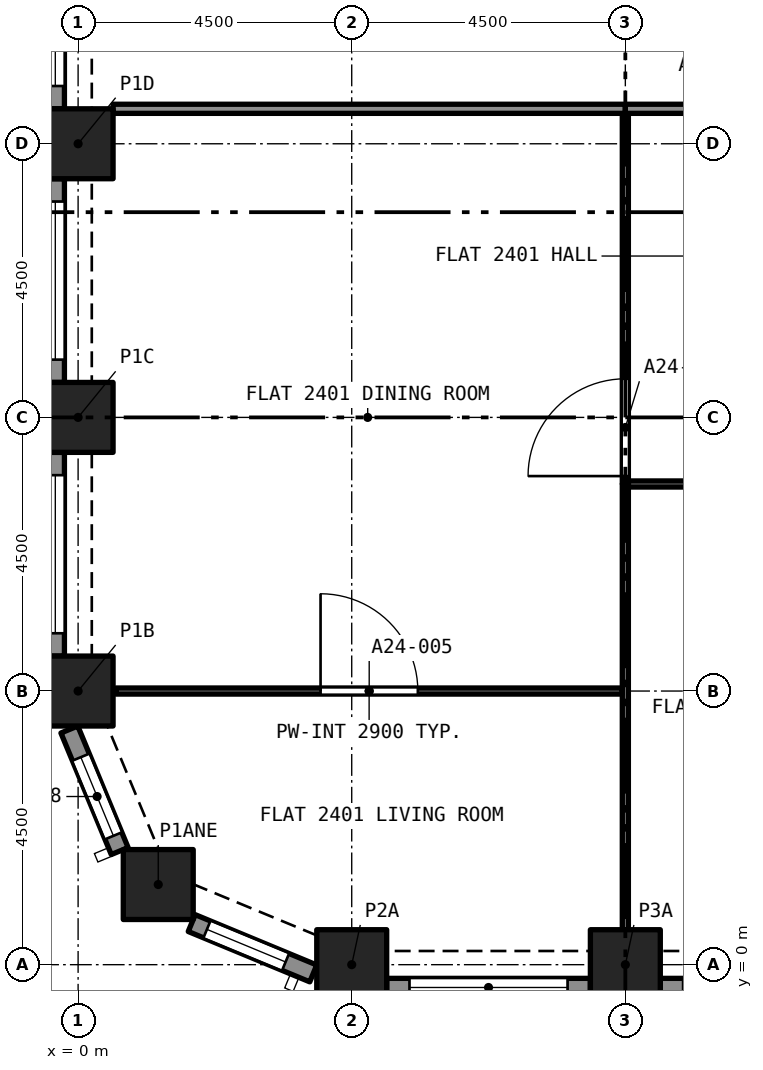
"""IFC4 building model, lengths in metres.
Left out: names, types, materials, properties, quantities, classifications, styles, units other than length and angle.
Written with IfcOpenShell. Run it as: python <this file> out.ifc"""

import sys

from ifc_helpers import new_model, si_unit, direction, frame, frame_2d, origin, origin_2d, place, context, subcontext, project, spatial, rectangle, extrude, element, fill, save


model = new_model("IFC4")
c1 = context("Model", 3, precision=1e-05, world=origin(), true_north=direction((0.0, 1.0)))
c2 = subcontext(c1, "Body", "Model", "MODEL_VIEW")
j1 = project(units=[si_unit("LENGTHUNIT", "METRE"), si_unit("PLANEANGLEUNIT", "RADIAN")], contexts=[c1])
p1 = place(None, origin())
s1 = spatial("IfcSite", under=j1, at=p1, CompositionType="ELEMENT")
p2 = place(p1, origin())
s2 = spatial("IfcBuilding", under=s1, at=p2, CompositionType="ELEMENT")
p3 = place(p2, frame((0.0, 0.0, 89.6)))
s3 = spatial("IfcBuildingStorey", under=s2, at=p3, CompositionType="ELEMENT", Elevation=89.6)
for number, where, z_axis, x_axis in (
    (1, (4.5, 0.0, 0.0), (0.0, 0.0, 1.0), (1.0, 0.0, 0.0)),
    (2, (9.0, 0.0, 0.0), (0.0, 0.0, 1.0), (1.0, 0.0, 0.0)),
    (3, (1.318, 1.318, 0.0), (0.0, 0.0, 1.0), (1.0, 0.0, 0.0)),
    (4, (0.0, 4.5, 0.0), (0.0, 0.0, 1.0), (1.0, 0.0, 0.0)),
    (5, (0.0, 9.0, 0.0), (0.0, 0.0, 1.0), (1.0, 0.0, 0.0)),
    (6, (0.0, 13.5, 0.0), (0.0, 0.0, 1.0), (1.0, 0.0, 0.0)),
):
    element("IfcColumn", number, at=place(p3, frame(where, z_axis=z_axis, x_axis=x_axis)), inside=s3, PredefinedType="COLUMN", context=c2, shape_type="SweptSolid", body=[
        extrude(rectangle(XDim=1.15, YDim=1.15, at=origin_2d()), origin(), (0.0, 0.0, 1.0), 3.2),
    ])
p4 = place(p3, frame((0.684, 1.869, 0.0), z_axis=(0.0, 0.0, 1.0), x_axis=(-0.382723818695, 0.923862802911, 0.0)))
e7 = element("IfcWall", 7, at=p4, inside=s3, PredefinedType="SOLIDWALL", context=c2, shape_type="SweptSolid", body=[
    extrude(rectangle(XDim=2.164, YDim=0.3, at=frame_2d((1.082, 0.0))), origin(), (0.0, 0.0, 1.0), 3.2),
])
p5 = place(p4, frame((0.271, 0.0, 0.45)))
e8 = element("IfcOpeningElement", 8, at=p5, cuts=e7, PredefinedType="OPENING", context=c2, shape_type="SweptSolid", body=[
    extrude(rectangle(XDim=1.4, YDim=1.95, at=frame_2d((0.7, 0.975))), frame((0.0, 0.16, 0.0), z_axis=(0.0, -1.0, 0.0), x_axis=(1.0, 0.0, 0.0)), (0.0, 0.0, 1.0), 0.32),
])
p6 = place(p3, frame((3.868, -0.144, 0.0), z_axis=(0.0, 0.0, 1.0), x_axis=(-0.923862802911, 0.382723818695, 0.0)))
e9 = element("IfcWall", 9, at=p6, inside=s3, PredefinedType="SOLIDWALL", context=c2, shape_type="SweptSolid", body=[
    extrude(rectangle(XDim=2.164, YDim=0.3, at=frame_2d((1.082, 0.0))), origin(), (0.0, 0.0, 1.0), 3.2),
])
p7 = place(p6, frame((0.493, 0.0, 0.45)))
e10 = element("IfcOpeningElement", 10, at=p7, cuts=e9, PredefinedType="OPENING", context=c2, shape_type="SweptSolid", body=[
    extrude(rectangle(XDim=1.4, YDim=1.95, at=frame_2d((0.7, 0.975))), frame((0.0, 0.16, 0.0), z_axis=(0.0, -1.0, 0.0), x_axis=(1.0, 0.0, 0.0)), (0.0, 0.0, 1.0), 0.32),
])
p8 = place(p3, frame((8.425, -0.375, 0.0), z_axis=(0.0, 0.0, 1.0), x_axis=(-1.0, 0.0, 0.0)))
e11 = element("IfcWall", 11, at=p8, inside=s3, PredefinedType="SOLIDWALL", context=c2, shape_type="SweptSolid", body=[
    extrude(rectangle(XDim=3.35, YDim=0.3, at=frame_2d((1.675, 0.0))), origin(), (0.0, 0.0, 1.0), 3.2),
])
p9 = place(p8, frame((0.375, 0.0, 0.45)))
e12 = element("IfcOpeningElement", 12, at=p9, cuts=e11, PredefinedType="OPENING", context=c2, shape_type="SweptSolid", body=[
    extrude(rectangle(XDim=2.6, YDim=1.95, at=frame_2d((1.3, 0.975))), frame((0.0, 0.16, 0.0), z_axis=(0.0, -1.0, 0.0), x_axis=(1.0, 0.0, 0.0)), (0.0, 0.0, 1.0), 0.32),
])
p10 = place(p3, frame((12.925, -0.375, 0.0), z_axis=(0.0, 0.0, 1.0), x_axis=(-1.0, 0.0, 0.0)))
e13 = element("IfcWall", 13, at=p10, inside=s3, PredefinedType="SOLIDWALL", context=c2, shape_type="SweptSolid", body=[
    extrude(rectangle(XDim=3.35, YDim=0.3, at=frame_2d((1.675, 0.0))), origin(), (0.0, 0.0, 1.0), 3.2),
])
p11 = place(p10, frame((0.375, 0.0, 0.45)))
e14 = element("IfcOpeningElement", 14, at=p11, cuts=e13, PredefinedType="OPENING", context=c2, shape_type="SweptSolid", body=[
    extrude(rectangle(XDim=2.6, YDim=1.95, at=frame_2d((1.3, 0.975))), frame((0.0, 0.16, 0.0), z_axis=(0.0, -1.0, 0.0), x_axis=(1.0, 0.0, 0.0)), (0.0, 0.0, 1.0), 0.32),
])
p12 = place(p3, frame((-0.375, 14.075, 0.0), z_axis=(0.0, 0.0, 1.0), x_axis=(0.0, 1.0, 0.0)))
e15 = element("IfcWall", 15, at=p12, inside=s3, PredefinedType="SOLIDWALL", context=c2, shape_type="SweptSolid", body=[
    extrude(rectangle(XDim=3.35, YDim=0.3, at=frame_2d((1.675, 0.0))), origin(), (0.0, 0.0, 1.0), 3.2),
])
p13 = place(p12, frame((0.375, 0.0, 0.45)))
e16 = element("IfcOpeningElement", 16, at=p13, cuts=e15, PredefinedType="OPENING", context=c2, shape_type="SweptSolid", body=[
    extrude(rectangle(XDim=2.6, YDim=1.95, at=frame_2d((1.3, 0.975))), frame((0.0, 0.16, 0.0), z_axis=(0.0, -1.0, 0.0), x_axis=(1.0, 0.0, 0.0)), (0.0, 0.0, 1.0), 0.32),
])
p14 = place(p3, frame((-0.375, 9.575, 0.0), z_axis=(0.0, 0.0, 1.0), x_axis=(0.0, 1.0, 0.0)))
e17 = element("IfcWall", 17, at=p14, inside=s3, PredefinedType="SOLIDWALL", context=c2, shape_type="SweptSolid", body=[
    extrude(rectangle(XDim=3.35, YDim=0.3, at=frame_2d((1.675, 0.0))), origin(), (0.0, 0.0, 1.0), 3.2),
])
p15 = place(p14, frame((0.375, 0.0, 0.45)))
e18 = element("IfcOpeningElement", 18, at=p15, cuts=e17, PredefinedType="OPENING", context=c2, shape_type="SweptSolid", body=[
    extrude(rectangle(XDim=2.6, YDim=1.95, at=frame_2d((1.3, 0.975))), frame((0.0, 0.16, 0.0), z_axis=(0.0, -1.0, 0.0), x_axis=(1.0, 0.0, 0.0)), (0.0, 0.0, 1.0), 0.32),
])
p16 = place(p3, frame((-0.375, 5.075, 0.0), z_axis=(0.0, 0.0, 1.0), x_axis=(0.0, 1.0, 0.0)))
e19 = element("IfcWall", 19, at=p16, inside=s3, PredefinedType="SOLIDWALL", context=c2, shape_type="SweptSolid", body=[
    extrude(rectangle(XDim=3.35, YDim=0.3, at=frame_2d((1.675, 0.0))), origin(), (0.0, 0.0, 1.0), 3.2),
])
p17 = place(p16, frame((0.375, 0.0, 0.45)))
e20 = element("IfcOpeningElement", 20, at=p17, cuts=e19, PredefinedType="OPENING", context=c2, shape_type="SweptSolid", body=[
    extrude(rectangle(XDim=2.6, YDim=1.95, at=frame_2d((1.3, 0.975))), frame((0.0, 0.16, 0.0), z_axis=(0.0, -1.0, 0.0), x_axis=(1.0, 0.0, 0.0)), (0.0, 0.0, 1.0), 0.32),
])
p18 = place(p3, frame((13.5, 7.905, 0.0), z_axis=(0.0, 0.0, 1.0), x_axis=(-1.0, 0.0, 0.0)))
e21 = element("IfcWall", 21, at=p18, inside=s3, PredefinedType="PARTITIONING", context=c2, shape_type="SweptSolid", body=[
    extrude(rectangle(XDim=4.45, YDim=0.1, at=frame_2d((2.225, 0.0))), origin(), (0.0, 0.0, 1.0), 2.9),
])
p19 = place(p18, frame((1.8, 0.0, 0.0)))
e22 = element("IfcOpeningElement", 22, at=p19, cuts=e21, PredefinedType="OPENING", context=c2, shape_type="SweptSolid", body=[
    extrude(rectangle(XDim=0.9, YDim=2.1, at=frame_2d((0.45, 1.05))), frame((0.0, 0.06, 0.0), z_axis=(0.0, -1.0, 0.0), x_axis=(1.0, 0.0, 0.0)), (0.0, 0.0, 1.0), 0.12),
])
p20 = place(p3, frame((9.0, 0.575, 0.0), z_axis=(0.0, 0.0, 1.0), x_axis=(0.0, 1.0, 0.0)))
e23 = element("IfcWall", 23, at=p20, inside=s3, PredefinedType="PARTITIONING", context=c2, shape_type="SweptSolid", body=[
    extrude(rectangle(XDim=7.33, YDim=0.1, at=frame_2d((3.665, 0.0))), origin(), (0.0, 0.0, 1.0), 2.9),
])
p21 = place(p3, frame((9.0, 7.905, 0.0), z_axis=(0.0, 0.0, 1.0), x_axis=(0.0, 1.0, 0.0)))
e24 = element("IfcWall", 24, at=p21, inside=s3, PredefinedType="PARTITIONING", context=c2, shape_type="SweptSolid", body=[
    extrude(rectangle(XDim=6.095, YDim=0.1, at=frame_2d((3.047, 0.0))), origin(), (0.0, 0.0, 1.0), 2.9),
])
p22 = place(p21, frame((0.13, 0.0, 0.0)))
e25 = element("IfcOpeningElement", 25, at=p22, cuts=e24, PredefinedType="OPENING", context=c2, shape_type="SweptSolid", body=[
    extrude(rectangle(XDim=1.6, YDim=2.1, at=frame_2d((0.8, 1.05))), frame((0.0, 0.06, 0.0), z_axis=(0.0, -1.0, 0.0), x_axis=(1.0, 0.0, 0.0)), (0.0, 0.0, 1.0), 0.12),
])
p23 = place(p3, frame((0.622, 4.5, 0.0), z_axis=(0.0, 0.0, 1.0), x_axis=(1.0, 0.0, 0.0)))
e26 = element("IfcWall", 26, at=p23, inside=s3, PredefinedType="PARTITIONING", context=c2, shape_type="SweptSolid", body=[
    extrude(rectangle(XDim=8.328, YDim=0.1, at=frame_2d((4.164, 0.0))), origin(), (0.0, 0.0, 1.0), 2.9),
])
p24 = place(p23, frame((3.365, 0.0, 0.0)))
e27 = element("IfcOpeningElement", 27, at=p24, cuts=e26, PredefinedType="OPENING", context=c2, shape_type="SweptSolid", body=[
    extrude(rectangle(XDim=1.6, YDim=2.1, at=frame_2d((0.8, 1.05))), frame((0.0, 0.06, 0.0), z_axis=(0.0, -1.0, 0.0), x_axis=(1.0, 0.0, 0.0)), (0.0, 0.0, 1.0), 0.12),
])
p25 = place(p3, frame((0.575, 14.075, 0.0), z_axis=(0.0, 0.0, 1.0), x_axis=(1.0, 0.0, 0.0)))
e28 = element("IfcWall", 28, at=p25, inside=s3, PredefinedType="PARTITIONING", context=c2, shape_type="SweptSolid", body=[
    extrude(rectangle(XDim=8.425, YDim=0.15, at=frame_2d((4.212, 0.0))), origin(), (0.0, 0.0, 1.0), 2.9),
])
p26 = place(p3, frame((11.925, 14.075, 0.0), z_axis=(0.0, 0.0, 1.0), x_axis=(-1.0, 0.0, 0.0)))
e29 = element("IfcWall", 29, at=p26, inside=s3, PredefinedType="PARTITIONING", context=c2, shape_type="SweptSolid", body=[
    extrude(rectangle(XDim=2.925, YDim=0.15, at=frame_2d((1.462, 0.0))), origin(), (0.0, 0.0, 1.0), 2.9),
])
p27 = place(p26, frame((0.175, 0.0, 0.0)))
e30 = element("IfcOpeningElement", 30, at=p27, cuts=e29, PredefinedType="OPENING", context=c2, shape_type="SweptSolid", body=[
    extrude(rectangle(XDim=1.0, YDim=2.1, at=frame_2d((0.5, 1.05))), frame((0.0, 0.085, 0.0), z_axis=(0.0, -1.0, 0.0), x_axis=(1.0, 0.0, 0.0)), (0.0, 0.0, 1.0), 0.17),
])
p28 = place(p5, origin())
e31 = element("IfcWindow", 31, at=p28, inside=s3, PartitioningType="SINGLE_PANEL", PredefinedType="WINDOW", context=c2, shape_type="SweptSolid", body=[
    extrude(rectangle(XDim=1.4, YDim=1.95, at=frame_2d((0.7, 0.975))), frame((0.0, 0.03, 0.0), z_axis=(0.0, -1.0, 0.0), x_axis=(1.0, 0.0, 0.0)), (0.0, 0.0, 1.0), 0.06),
])
fill(e8, e31)
p29 = place(p7, origin())
e32 = element("IfcWindow", 32, at=p29, inside=s3, PartitioningType="SINGLE_PANEL", PredefinedType="WINDOW", context=c2, shape_type="SweptSolid", body=[
    extrude(rectangle(XDim=1.4, YDim=1.95, at=frame_2d((0.7, 0.975))), frame((0.0, 0.03, 0.0), z_axis=(0.0, -1.0, 0.0), x_axis=(1.0, 0.0, 0.0)), (0.0, 0.0, 1.0), 0.06),
])
fill(e10, e32)
p30 = place(p9, origin())
e33 = element("IfcWindow", 33, at=p30, inside=s3, PartitioningType="SINGLE_PANEL", PredefinedType="WINDOW", context=c2, shape_type="SweptSolid", body=[
    extrude(rectangle(XDim=2.6, YDim=1.95, at=frame_2d((1.3, 0.975))), frame((0.0, 0.03, 0.0), z_axis=(0.0, -1.0, 0.0), x_axis=(1.0, 0.0, 0.0)), (0.0, 0.0, 1.0), 0.06),
])
fill(e12, e33)
p31 = place(p13, origin())
e34 = element("IfcWindow", 34, at=p31, inside=s3, PartitioningType="SINGLE_PANEL", PredefinedType="WINDOW", context=c2, shape_type="SweptSolid", body=[
    extrude(rectangle(XDim=2.6, YDim=1.95, at=frame_2d((1.3, 0.975))), frame((0.0, 0.03, 0.0), z_axis=(0.0, -1.0, 0.0), x_axis=(1.0, 0.0, 0.0)), (0.0, 0.0, 1.0), 0.06),
])
fill(e16, e34)
p32 = place(p15, origin())
e35 = element("IfcWindow", 35, at=p32, inside=s3, PartitioningType="SINGLE_PANEL", PredefinedType="WINDOW", context=c2, shape_type="SweptSolid", body=[
    extrude(rectangle(XDim=2.6, YDim=1.95, at=frame_2d((1.3, 0.975))), frame((0.0, 0.03, 0.0), z_axis=(0.0, -1.0, 0.0), x_axis=(1.0, 0.0, 0.0)), (0.0, 0.0, 1.0), 0.06),
])
fill(e18, e35)
p33 = place(p17, origin())
e36 = element("IfcWindow", 36, at=p33, inside=s3, PartitioningType="SINGLE_PANEL", PredefinedType="WINDOW", context=c2, shape_type="SweptSolid", body=[
    extrude(rectangle(XDim=2.6, YDim=1.95, at=frame_2d((1.3, 0.975))), frame((0.0, 0.03, 0.0), z_axis=(0.0, -1.0, 0.0), x_axis=(1.0, 0.0, 0.0)), (0.0, 0.0, 1.0), 0.06),
])
fill(e20, e36)
p34 = place(p22, origin())
e37 = element("IfcDoor", 37, at=p34, inside=s3, OperationType="SINGLE_SWING_LEFT", PredefinedType="DOOR", context=c2, shape_type="SweptSolid", body=[
    extrude(rectangle(XDim=1.6, YDim=2.1, at=frame_2d((0.8, 1.05))), frame((0.0, 0.025, 0.0), z_axis=(0.0, -1.0, 0.0), x_axis=(1.0, 0.0, 0.0)), (0.0, 0.0, 1.0), 0.05),
])
fill(e25, e37)
p35 = place(p24, origin())
e38 = element("IfcDoor", 38, at=p35, inside=s3, OperationType="SINGLE_SWING_RIGHT", PredefinedType="DOOR", context=c2, shape_type="SweptSolid", body=[
    extrude(rectangle(XDim=1.6, YDim=2.1, at=frame_2d((0.8, 1.05))), frame((0.0, 0.025, 0.0), z_axis=(0.0, -1.0, 0.0), x_axis=(1.0, 0.0, 0.0)), (0.0, 0.0, 1.0), 0.05),
])
fill(e27, e38)
save(model, sys.argv[1])
